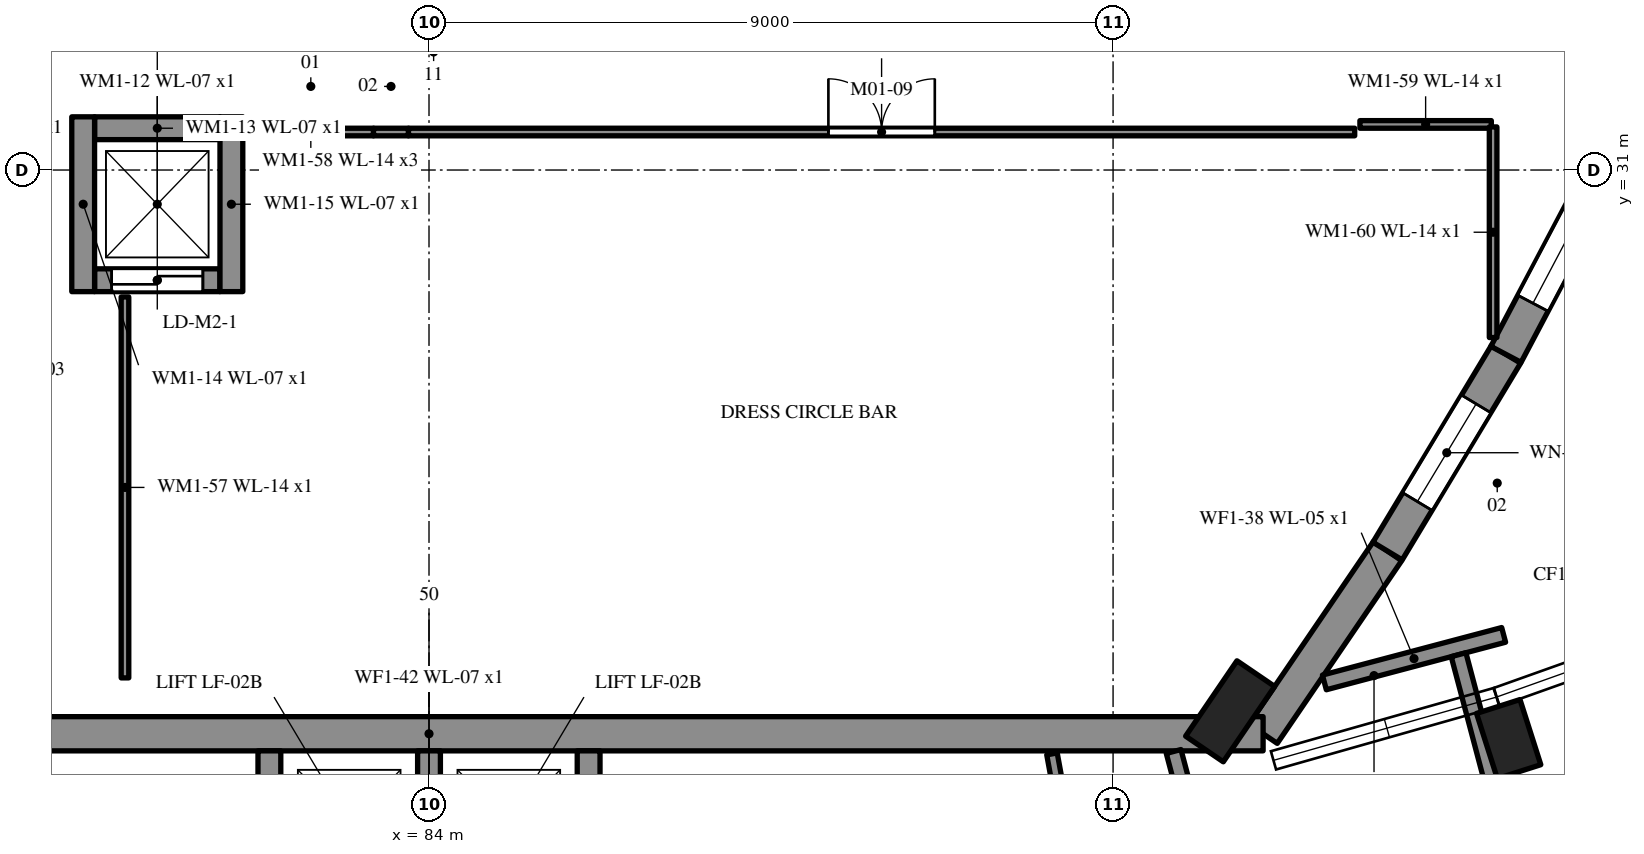
"""IFC4 building model, lengths in metres.
Left out: names, types, materials, properties, quantities, classifications, styles, units other than length and angle.
Written with IfcOpenShell. Run it as: python <this file> out.ifc"""

import sys

from ifc_helpers import new_model, si_unit, direction, frame, frame_2d, origin, origin_2d, place, context, subcontext, project, spatial, rectangle, extrude, element, fill, save


model = new_model("IFC4")
c1 = context("Model", 3, precision=1e-05, world=origin(), true_north=direction((0.0, 1.0)))
c2 = subcontext(c1, "Body", "Model", "MODEL_VIEW")
j1 = project(units=[si_unit("LENGTHUNIT", "METRE"), si_unit("PLANEANGLEUNIT", "RADIAN")], contexts=[c1])
p1 = place(None, origin())
s1 = spatial("IfcSite", under=j1, at=p1, CompositionType="ELEMENT")
p2 = place(p1, origin())
s2 = spatial("IfcBuilding", under=s1, at=p2, CompositionType="ELEMENT")
p3 = place(p2, frame((0.0, 0.0, 5.4)))
s3 = spatial("IfcBuildingStorey", under=s2, at=p3, CompositionType="ELEMENT", Elevation=5.4)
p4 = place(p3, frame((94.974, 23.583, 0.0), z_axis=(0.0, 0.0, 1.0), x_axis=(0.5629642644, 0.826481238147, 0.0)))
e1 = element("IfcWall", 1, at=p4, inside=s3, PredefinedType="SOLIDWALL", context=c2, shape_type="SweptSolid", body=[
    extrude(rectangle(XDim=2.908, YDim=0.45, at=frame_2d((1.454, 0.0))), origin(), (0.0, 0.0, 1.0), 4.8),
])
p5 = place(p3, frame((96.611, 25.986, 0.0), z_axis=(0.0, 0.0, 1.0), x_axis=(0.515636119523, 0.856807675177, 0.0)))
e2 = element("IfcWall", 2, at=p5, inside=s3, PredefinedType="SOLIDWALL", context=c2, shape_type="SweptSolid", body=[
    extrude(rectangle(XDim=3.021, YDim=0.45, at=frame_2d((1.511, 0.0))), origin(), (0.0, 0.0, 1.0), 4.8),
])
p6 = place(p5, frame((0.76, 0.0, 0.9)))
e3 = element("IfcOpeningElement", 3, at=p6, cuts=e2, PredefinedType="OPENING", context=c2, shape_type="SweptSolid", body=[
    extrude(rectangle(XDim=1.5, YDim=2.1, at=frame_2d((0.75, 1.05))), frame((0.0, 0.235, 0.0), z_axis=(0.0, -1.0, 0.0), x_axis=(1.0, 0.0, 0.0)), (0.0, 0.0, 1.0), 0.47),
])
p7 = place(p3, frame((98.169, 28.575, 0.0), z_axis=(0.0, 0.0, 1.0), x_axis=(0.466728769487, 0.884400506407, 0.0)))
e4 = element("IfcWall", 4, at=p7, inside=s3, PredefinedType="SOLIDWALL", context=c2, shape_type="SweptSolid", body=[
    extrude(rectangle(XDim=3.021, YDim=0.45, at=frame_2d((1.51, 0.0))), origin(), (0.0, 0.0, 1.0), 4.8),
])
p8 = place(p7, frame((0.76, 0.0, 0.9)))
e5 = element("IfcOpeningElement", 5, at=p8, cuts=e4, PredefinedType="OPENING", context=c2, shape_type="SweptSolid", body=[
    extrude(rectangle(XDim=1.5, YDim=2.1, at=frame_2d((0.75, 1.05))), frame((0.0, 0.235, 0.0), z_axis=(0.0, -1.0, 0.0), x_axis=(1.0, 0.0, 0.0)), (0.0, 0.0, 1.0), 0.47),
])
p9 = place(p3, frame((73.026, 23.583, 0.0), z_axis=(0.0, 0.0, 1.0), x_axis=(1.0, 0.0, 0.0)))
e6 = element("IfcWall", 6, at=p9, inside=s3, PredefinedType="SOLIDWALL", context=c2, shape_type="SweptSolid", body=[
    extrude(rectangle(XDim=21.948, YDim=0.45, at=frame_2d((10.974, 0.0))), origin(), (0.0, 0.0, 1.0), 4.8),
])
p10 = place(p3, frame((94.54, 23.878, 0.0), z_axis=(0.0, 0.0, 1.0), x_axis=(0.562978035902, 0.82647185741, 0.0)))
e7 = element("IfcColumn", 7, at=p10, inside=s3, PredefinedType="PILASTER", context=c2, shape_type="SweptSolid", body=[
    extrude(rectangle(XDim=1.2, YDim=0.6, at=origin_2d()), origin(), (0.0, 0.0, 1.0), 4.8),
])
p11 = place(p3, frame((79.6, 29.55, 0.0), z_axis=(0.0, 0.0, 1.0), x_axis=(1.0, 0.0, 0.0)))
e8 = element("IfcWall", 8, at=p11, inside=s3, PredefinedType="SHEAR", context=c2, shape_type="SweptSolid", body=[
    extrude(rectangle(XDim=1.65, YDim=0.3, at=frame_2d((0.825, 0.0))), origin(), (0.0, 0.0, 1.0), 4.8),
])
p12 = place(p11, frame((0.225, 0.0, 0.0)))
e9 = element("IfcOpeningElement", 9, at=p12, cuts=e8, PredefinedType="OPENING", context=c2, shape_type="SweptSolid", body=[
    extrude(rectangle(XDim=1.2, YDim=2.2, at=frame_2d((0.6, 1.1))), frame((0.0, 0.16, 0.0), z_axis=(0.0, -1.0, 0.0), x_axis=(1.0, 0.0, 0.0)), (0.0, 0.0, 1.0), 0.32),
])
p13 = place(p3, frame((81.25, 31.55, 0.0), z_axis=(0.0, 0.0, 1.0), x_axis=(-1.0, 0.0, 0.0)))
e10 = element("IfcWall", 10, at=p13, inside=s3, PredefinedType="SHEAR", context=c2, shape_type="SweptSolid", body=[
    extrude(rectangle(XDim=1.65, YDim=0.3, at=frame_2d((0.825, 0.0))), origin(), (0.0, 0.0, 1.0), 4.8),
])
for number, where, z_axis, x_axis in (
    (11, (79.45, 31.7, 0.0), (0.0, 0.0, 1.0), (0.0, -1.0, 0.0)),
    (12, (81.4, 29.4, 0.0), (0.0, 0.0, 1.0), (0.0, 1.0, 0.0)),
):
    element("IfcWall", number, at=place(p3, frame(where, z_axis=z_axis, x_axis=x_axis)), inside=s3, PredefinedType="SHEAR", context=c2, shape_type="SweptSolid", body=[
        extrude(rectangle(XDim=2.3, YDim=0.3, at=frame_2d((1.15, 0.0))), origin(), (0.0, 0.0, 1.0), 4.8),
    ])
p14 = place(p3, frame((98.205, 23.513, 0.0), z_axis=(0.0, 0.0, 1.0), x_axis=(0.304171062495, -0.952617428321, 0.0)))
e13 = element("IfcColumn", 13, at=p14, inside=s3, PredefinedType="PILASTER", context=c2, shape_type="SweptSolid", body=[
    extrude(rectangle(XDim=0.9, YDim=0.6, at=origin_2d()), origin(), (0.0, 0.0, 1.0), 4.8),
])
p15 = place(p3, frame((80.0, 24.318, 0.0), z_axis=(0.0, 0.0, 1.0), x_axis=(0.0, 1.0, 0.0)))
e14 = element("IfcWall", 14, at=p15, inside=s3, PredefinedType="PARTITIONING", context=c2, shape_type="SweptSolid", body=[
    extrude(rectangle(XDim=5.012, YDim=0.1, at=frame_2d((2.506, 0.0))), origin(), (0.0, 0.0, 1.0), 4.55),
])
p16 = place(p3, frame((81.62, 31.5, 0.0), z_axis=(0.0, 0.0, 1.0), x_axis=(1.0, 0.0, 0.0)))
e15 = element("IfcWall", 15, at=p16, inside=s3, PredefinedType="PARTITIONING", context=c2, shape_type="SweptSolid", body=[
    extrude(rectangle(XDim=1.65, YDim=0.1, at=frame_2d((0.825, 0.0))), origin(), (0.0, 0.0, 1.0), 4.55),
])
p17 = place(p3, frame((83.27, 31.5, 0.0), z_axis=(0.0, 0.0, 1.0), x_axis=(1.0, 0.0, 0.0)))
e16 = element("IfcWall", 16, at=p17, inside=s3, PredefinedType="PARTITIONING", context=c2, shape_type="SweptSolid", body=[
    extrude(rectangle(XDim=0.46, YDim=0.1, at=frame_2d((0.23, 0.0))), origin(), (0.0, 0.0, 1.0), 3.72),
])
p18 = place(p3, frame((83.73, 31.5, 0.0), z_axis=(0.0, 0.0, 1.0), x_axis=(1.0, 0.0, 0.0)))
e17 = element("IfcWall", 17, at=p18, inside=s3, PredefinedType="PARTITIONING", context=c2, shape_type="SweptSolid", body=[
    extrude(rectangle(XDim=12.449, YDim=0.1, at=frame_2d((6.225, 0.0))), origin(), (0.0, 0.0, 1.0), 4.55),
])
p19 = place(p18, frame((5.525, 0.0, 0.0)))
e18 = element("IfcOpeningElement", 18, at=p19, cuts=e17, PredefinedType="OPENING", context=c2, shape_type="SweptSolid", body=[
    extrude(rectangle(XDim=1.4, YDim=2.1, at=frame_2d((0.7, 1.05))), frame((0.0, 0.06, 0.0), z_axis=(0.0, -1.0, 0.0), x_axis=(1.0, 0.0, 0.0)), (0.0, 0.0, 1.0), 0.12),
])
p20 = place(p3, frame((96.248, 31.6, 0.0), z_axis=(0.0, 0.0, 1.0), x_axis=(1.0, 0.0, 0.0)))
e19 = element("IfcWall", 19, at=p20, inside=s3, PredefinedType="PARTITIONING", context=c2, shape_type="SweptSolid", body=[
    extrude(rectangle(XDim=1.729, YDim=0.1, at=frame_2d((0.865, 0.0))), origin(), (0.0, 0.0, 1.0), 4.55),
])
p21 = place(p3, frame((98.0, 31.567, 0.0), z_axis=(0.0, 0.0, 1.0), x_axis=(0.0, -1.0, 0.0)))
e20 = element("IfcWall", 20, at=p21, inside=s3, PredefinedType="PARTITIONING", context=c2, shape_type="SweptSolid", body=[
    extrude(rectangle(XDim=2.771, YDim=0.1, at=frame_2d((1.385, 0.0))), origin(), (0.0, 0.0, 1.0), 4.55),
])
p22 = place(p3, frame((98.138, 24.884, 0.0), z_axis=(0.0, 0.0, 1.0), x_axis=(-0.966582812495, -0.256354572009, 0.0)))
e21 = element("IfcWall", 21, at=p22, inside=s3, PredefinedType="SHEAR", context=c2, shape_type="SweptSolid", body=[
    extrude(rectangle(XDim=2.44, YDim=0.2, at=frame_2d((1.22, 0.0))), origin(), (0.0, 0.0, 1.0), 4.8),
])
p23 = place(p3, frame((99.596, 16.89, 0.0), z_axis=(0.0, 0.0, 1.0), x_axis=(-0.25631948932, 0.966592116352, 0.0)))
e22 = element("IfcWall", 22, at=p23, inside=s3, PredefinedType="SHEAR", context=c2, shape_type="SweptSolid", body=[
    extrude(rectangle(XDim=8.0, YDim=0.2, at=frame_2d((4.0, 0.0))), origin(), (0.0, 0.0, 1.0), 4.8),
])
p24 = place(p3, frame((95.778, 15.878, 0.0), z_axis=(0.0, 0.0, 1.0), x_axis=(-0.256333531377, 0.966588392591, 0.0)))
e23 = element("IfcWall", 23, at=p24, inside=s3, PredefinedType="SHEAR", context=c2, shape_type="SweptSolid", body=[
    extrude(rectangle(XDim=7.73, YDim=0.2, at=frame_2d((3.865, 0.0))), origin(), (0.0, 0.0, 1.0), 4.8),
])
for number, where, z_axis, x_axis in (
    (24, (81.9, 21.458, 0.0), (0.0, 0.0, 1.0), (0.0, 1.0, 0.0)),
    (25, (84.0, 21.458, 0.0), (0.0, 0.0, 1.0), (0.0, 1.0, 0.0)),
    (26, (86.1, 21.458, 0.0), (0.0, 0.0, 1.0), (0.0, 1.0, 0.0)),
):
    element("IfcWall", number, at=place(p3, frame(where, z_axis=z_axis, x_axis=x_axis)), inside=s3, PredefinedType="SHEAR", context=c2, shape_type="SweptSolid", body=[
        extrude(rectangle(XDim=1.9, YDim=0.3, at=frame_2d((0.95, 0.0))), origin(), (0.0, 0.0, 1.0), 4.8),
    ])
p25 = place(p3, frame((92.196, 23.318, 0.0), z_axis=(0.0, 0.0, 1.0), x_axis=(0.180428728445, -0.983588061107, 0.0)))
e27 = element("IfcWall", 27, at=p25, inside=s3, PredefinedType="PARTITIONING", context=c2, shape_type="SweptSolid", body=[
    extrude(rectangle(XDim=3.786, YDim=0.14, at=frame_2d((1.893, 0.0))), origin(), (0.0, 0.0, 1.0), 4.58),
])
p26 = place(p12, origin())
e28 = element("IfcDoor", 28, at=p26, inside=s3, OperationType="SLIDING_TO_LEFT", PredefinedType="DOOR", context=c2, shape_type="SweptSolid", body=[
    extrude(rectangle(XDim=1.2, YDim=2.2, at=frame_2d((0.6, 1.1))), frame((0.0, 0.025, 0.0), z_axis=(0.0, -1.0, 0.0), x_axis=(1.0, 0.0, 0.0)), (0.0, 0.0, 1.0), 0.05),
])
fill(e9, e28)
p27 = place(p6, origin())
e29 = element("IfcWindow", 29, at=p27, inside=s3, PartitioningType="SINGLE_PANEL", PredefinedType="WINDOW", context=c2, shape_type="SweptSolid", body=[
    extrude(rectangle(XDim=1.5, YDim=2.1, at=frame_2d((0.75, 1.05))), frame((0.0, 0.03, 0.0), z_axis=(0.0, -1.0, 0.0), x_axis=(1.0, 0.0, 0.0)), (0.0, 0.0, 1.0), 0.06),
])
fill(e3, e29)
p28 = place(p8, origin())
e30 = element("IfcWindow", 30, at=p28, inside=s3, PartitioningType="SINGLE_PANEL", PredefinedType="WINDOW", context=c2, shape_type="SweptSolid", body=[
    extrude(rectangle(XDim=1.5, YDim=2.1, at=frame_2d((0.75, 1.05))), frame((0.0, 0.03, 0.0), z_axis=(0.0, -1.0, 0.0), x_axis=(1.0, 0.0, 0.0)), (0.0, 0.0, 1.0), 0.06),
])
fill(e5, e30)
p29 = place(p19, origin())
e31 = element("IfcDoor", 31, at=p29, inside=s3, OperationType="DOUBLE_DOOR_SINGLE_SWING", PredefinedType="DOOR", context=c2, shape_type="SweptSolid", body=[
    extrude(rectangle(XDim=1.4, YDim=2.1, at=frame_2d((0.7, 1.05))), frame((0.0, 0.025, 0.0), z_axis=(0.0, -1.0, 0.0), x_axis=(1.0, 0.0, 0.0)), (0.0, 0.0, 1.0), 0.05),
])
fill(e18, e31)
save(model, sys.argv[1])
